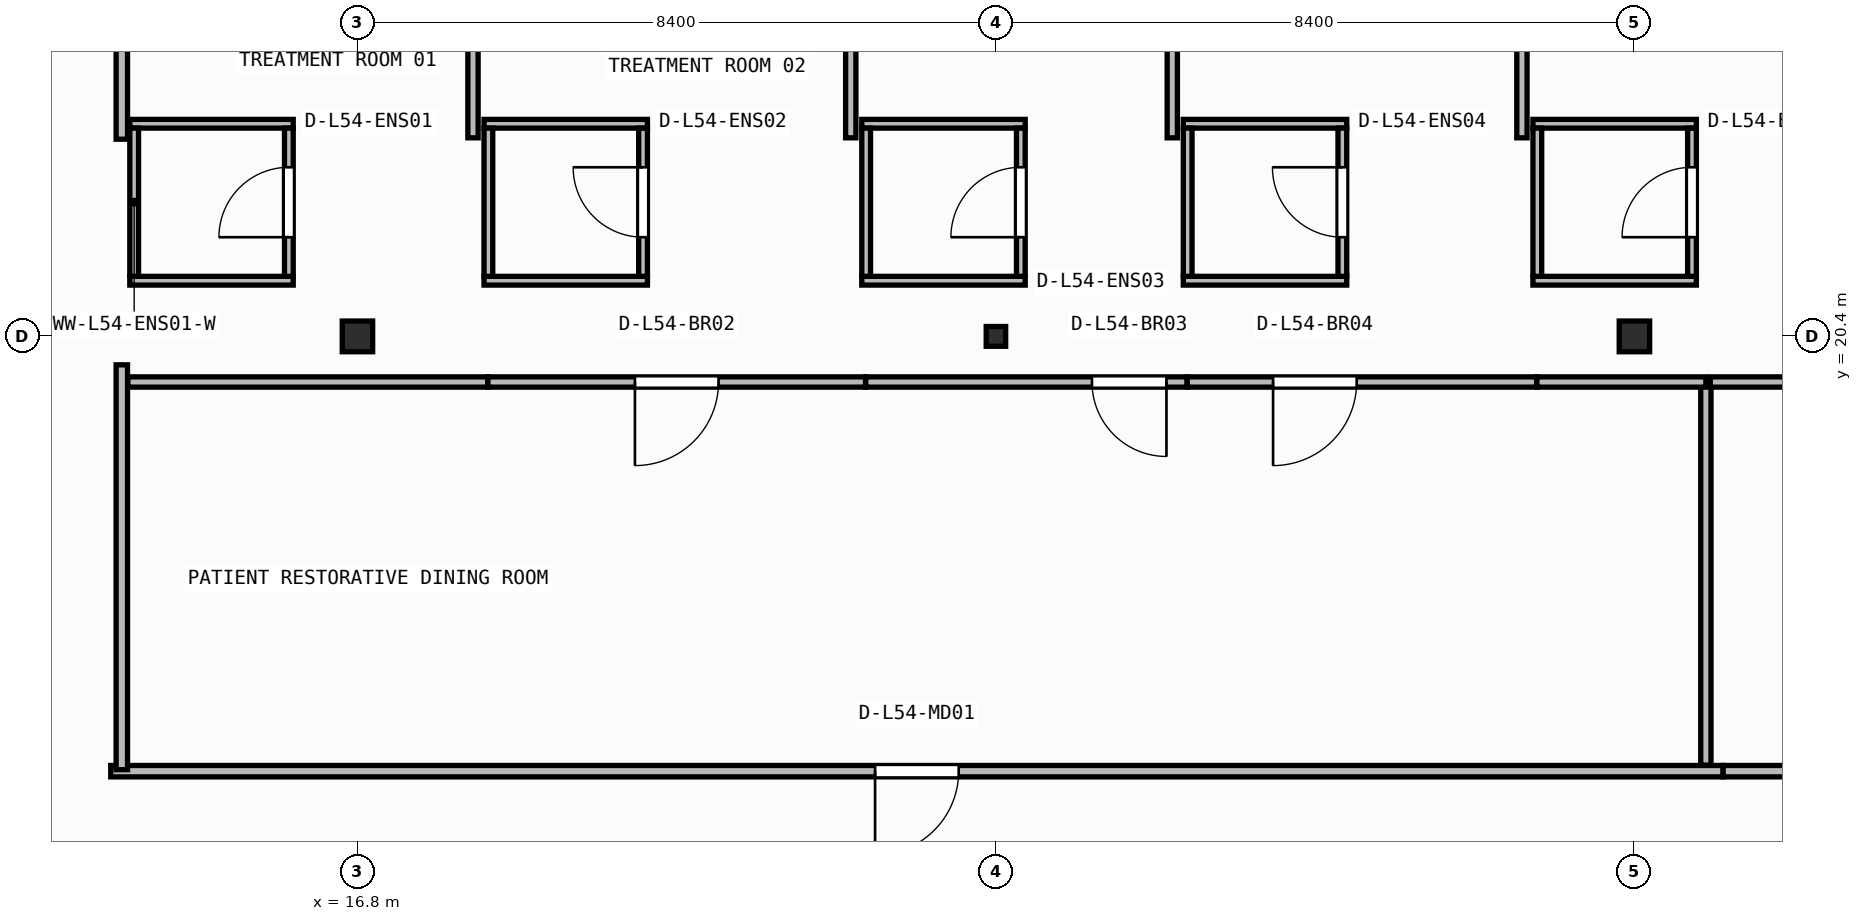
"""IFC4 building model, lengths in metres.
Left out: names, types, materials, properties, quantities, classifications, styles, units other than length and angle.
Written with IfcOpenShell. Run it as: python <this file> out.ifc"""

import sys

from ifc_helpers import new_model, si_unit, direction, frame, frame_2d, origin, origin_2d, place, context, subcontext, project, spatial, rectangle, i_section, extrude, element, fill, save


model = new_model("IFC4")
c1 = context("Model", 3, precision=1e-05, world=origin(), true_north=direction((0.0, 1.0)))
c2 = subcontext(c1, "Body", "Model", "MODEL_VIEW")
j1 = project(units=[si_unit("LENGTHUNIT", "METRE"), si_unit("PLANEANGLEUNIT", "RADIAN")], contexts=[c1])
p1 = place(None, origin())
s1 = spatial("IfcSite", under=j1, at=p1, CompositionType="ELEMENT")
p2 = place(p1, origin())
s2 = spatial("IfcBuilding", under=s1, at=p2, CompositionType="ELEMENT")
p3 = place(p2, frame((0.0, 0.0, 219.75)))
s3 = spatial("IfcBuildingStorey", under=s2, at=p3, CompositionType="ELEMENT", Elevation=219.75)
p4 = place(p3, frame((16.8, 20.4, 0.0), z_axis=(0.0, 0.0, 1.0), x_axis=(1.0, 0.0, 0.0)))
e1 = element("IfcColumn", 1, at=p4, inside=s3, PredefinedType="COLUMN", context=c2, shape_type="SweptSolid", body=[
    extrude(i_section(OverallWidth=0.4, OverallDepth=0.404, WebThickness=0.02, FlangeThickness=0.032, at=origin_2d()), origin(), (0.0, 0.0, 1.0), 3.95),
])
p5 = place(p3, frame((25.2, 20.4, 0.0), z_axis=(0.0, 0.0, 1.0), x_axis=(1.0, 0.0, 0.0)))
e2 = element("IfcColumn", 2, at=p5, inside=s3, PredefinedType="COLUMN", context=c2, shape_type="SweptSolid", body=[
    extrude(i_section(OverallWidth=0.256, OverallDepth=0.26, WebThickness=0.01, FlangeThickness=0.017, FilletRadius=0.013, at=origin_2d()), origin(), (0.0, 0.0, 1.0), 3.95),
])
p6 = place(p3, frame((33.6, 20.4, 0.0), z_axis=(0.0, 0.0, 1.0), x_axis=(1.0, 0.0, 0.0)))
e3 = element("IfcColumn", 3, at=p6, inside=s3, PredefinedType="COLUMN", context=c2, shape_type="SweptSolid", body=[
    extrude(i_section(OverallWidth=0.4, OverallDepth=0.404, WebThickness=0.02, FlangeThickness=0.032, at=origin_2d()), origin(), (0.0, 0.0, 1.0), 3.95),
])
for number, where, z_axis, x_axis in (
    (4, (13.805, 21.133, 0.0), (0.0, 0.0, 1.0), (1.0, 0.0, 0.0)),
    (5, (13.805, 23.198, 0.0), (0.0, 0.0, 1.0), (1.0, 0.0, 0.0)),
):
    element("IfcWall", number, at=place(p3, frame(where, z_axis=z_axis, x_axis=x_axis)), inside=s3, PredefinedType="PARTITIONING", context=c2, shape_type="SweptSolid", body=[
        extrude(rectangle(XDim=2.15, YDim=0.115, at=frame_2d((1.075, 0.0))), origin(), (0.0, 0.0, 1.0), 3.71),
    ])
p7 = place(p3, frame((13.863, 21.19, 0.0), z_axis=(0.0, 0.0, 1.0), x_axis=(0.0, 1.0, 0.0)))
e6 = element("IfcWall", 6, at=p7, inside=s3, PredefinedType="PARTITIONING", context=c2, shape_type="SweptSolid", body=[
    extrude(rectangle(XDim=1.95, YDim=0.115, at=frame_2d((0.975, 0.0))), origin(), (0.0, 0.0, 1.0), 3.71),
])
p8 = place(p3, frame((15.897, 21.19, 0.0), z_axis=(0.0, 0.0, 1.0), x_axis=(0.0, 1.0, 0.0)))
e7 = element("IfcWall", 7, at=p8, inside=s3, PredefinedType="PARTITIONING", context=c2, shape_type="SweptSolid", body=[
    extrude(rectangle(XDim=1.95, YDim=0.115, at=frame_2d((0.975, 0.0))), origin(), (0.0, 0.0, 1.0), 3.71),
])
p9 = place(p8, frame((0.515, 0.0, 0.0)))
e8 = element("IfcOpeningElement", 8, at=p9, cuts=e7, PredefinedType="OPENING", context=c2, shape_type="SweptSolid", body=[
    extrude(rectangle(XDim=0.92, YDim=2.1, at=frame_2d((0.46, 1.05))), frame((0.0, 0.067, 0.0), z_axis=(0.0, -1.0, 0.0), x_axis=(1.0, 0.0, 0.0)), (0.0, 0.0, 1.0), 0.135),
])
for number, where, z_axis, x_axis in (
    (9, (18.465, 21.133, 0.0), (0.0, 0.0, 1.0), (1.0, 0.0, 0.0)),
    (10, (18.465, 23.198, 0.0), (0.0, 0.0, 1.0), (1.0, 0.0, 0.0)),
):
    element("IfcWall", number, at=place(p3, frame(where, z_axis=z_axis, x_axis=x_axis)), inside=s3, PredefinedType="PARTITIONING", context=c2, shape_type="SweptSolid", body=[
        extrude(rectangle(XDim=2.15, YDim=0.115, at=frame_2d((1.075, 0.0))), origin(), (0.0, 0.0, 1.0), 3.71),
    ])
p10 = place(p3, frame((18.522, 21.19, 0.0), z_axis=(0.0, 0.0, 1.0), x_axis=(0.0, 1.0, 0.0)))
e11 = element("IfcWall", 11, at=p10, inside=s3, PredefinedType="PARTITIONING", context=c2, shape_type="SweptSolid", body=[
    extrude(rectangle(XDim=1.95, YDim=0.115, at=frame_2d((0.975, 0.0))), origin(), (0.0, 0.0, 1.0), 3.71),
])
p11 = place(p3, frame((20.558, 21.19, 0.0), z_axis=(0.0, 0.0, 1.0), x_axis=(0.0, 1.0, 0.0)))
e12 = element("IfcWall", 12, at=p11, inside=s3, PredefinedType="PARTITIONING", context=c2, shape_type="SweptSolid", body=[
    extrude(rectangle(XDim=1.95, YDim=0.115, at=frame_2d((0.975, 0.0))), origin(), (0.0, 0.0, 1.0), 3.71),
])
p12 = place(p11, frame((0.515, 0.0, 0.0)))
e13 = element("IfcOpeningElement", 13, at=p12, cuts=e12, PredefinedType="OPENING", context=c2, shape_type="SweptSolid", body=[
    extrude(rectangle(XDim=0.92, YDim=2.1, at=frame_2d((0.46, 1.05))), frame((0.0, 0.067, 0.0), z_axis=(0.0, -1.0, 0.0), x_axis=(1.0, 0.0, 0.0)), (0.0, 0.0, 1.0), 0.135),
])
for number, where, z_axis, x_axis in (
    (14, (23.435, 21.133, 0.0), (0.0, 0.0, 1.0), (1.0, 0.0, 0.0)),
    (15, (23.435, 23.198, 0.0), (0.0, 0.0, 1.0), (1.0, 0.0, 0.0)),
):
    element("IfcWall", number, at=place(p3, frame(where, z_axis=z_axis, x_axis=x_axis)), inside=s3, PredefinedType="PARTITIONING", context=c2, shape_type="SweptSolid", body=[
        extrude(rectangle(XDim=2.15, YDim=0.115, at=frame_2d((1.075, 0.0))), origin(), (0.0, 0.0, 1.0), 3.71),
    ])
p13 = place(p3, frame((23.492, 21.19, 0.0), z_axis=(0.0, 0.0, 1.0), x_axis=(0.0, 1.0, 0.0)))
e16 = element("IfcWall", 16, at=p13, inside=s3, PredefinedType="PARTITIONING", context=c2, shape_type="SweptSolid", body=[
    extrude(rectangle(XDim=1.95, YDim=0.115, at=frame_2d((0.975, 0.0))), origin(), (0.0, 0.0, 1.0), 3.71),
])
p14 = place(p3, frame((25.528, 21.19, 0.0), z_axis=(0.0, 0.0, 1.0), x_axis=(0.0, 1.0, 0.0)))
e17 = element("IfcWall", 17, at=p14, inside=s3, PredefinedType="PARTITIONING", context=c2, shape_type="SweptSolid", body=[
    extrude(rectangle(XDim=1.95, YDim=0.115, at=frame_2d((0.975, 0.0))), origin(), (0.0, 0.0, 1.0), 3.157),
])
p15 = place(p14, frame((0.515, 0.0, 0.0)))
e18 = element("IfcOpeningElement", 18, at=p15, cuts=e17, PredefinedType="OPENING", context=c2, shape_type="SweptSolid", body=[
    extrude(rectangle(XDim=0.92, YDim=2.1, at=frame_2d((0.46, 1.05))), frame((0.0, 0.067, 0.0), z_axis=(0.0, -1.0, 0.0), x_axis=(1.0, 0.0, 0.0)), (0.0, 0.0, 1.0), 0.135),
])
for number, where, z_axis, x_axis in (
    (19, (27.665, 21.133, 0.0), (0.0, 0.0, 1.0), (1.0, 0.0, 0.0)),
    (20, (27.665, 23.198, 0.0), (0.0, 0.0, 1.0), (1.0, 0.0, 0.0)),
):
    element("IfcWall", number, at=place(p3, frame(where, z_axis=z_axis, x_axis=x_axis)), inside=s3, PredefinedType="PARTITIONING", context=c2, shape_type="SweptSolid", body=[
        extrude(rectangle(XDim=2.15, YDim=0.115, at=frame_2d((1.075, 0.0))), origin(), (0.0, 0.0, 1.0), 3.71),
    ])
p16 = place(p3, frame((27.722, 21.19, 0.0), z_axis=(0.0, 0.0, 1.0), x_axis=(0.0, 1.0, 0.0)))
e21 = element("IfcWall", 21, at=p16, inside=s3, PredefinedType="PARTITIONING", context=c2, shape_type="SweptSolid", body=[
    extrude(rectangle(XDim=1.95, YDim=0.115, at=frame_2d((0.975, 0.0))), origin(), (0.0, 0.0, 1.0), 3.71),
])
p17 = place(p3, frame((29.758, 21.19, 0.0), z_axis=(0.0, 0.0, 1.0), x_axis=(0.0, 1.0, 0.0)))
e22 = element("IfcWall", 22, at=p17, inside=s3, PredefinedType="PARTITIONING", context=c2, shape_type="SweptSolid", body=[
    extrude(rectangle(XDim=1.95, YDim=0.115, at=frame_2d((0.975, 0.0))), origin(), (0.0, 0.0, 1.0), 3.71),
])
p18 = place(p17, frame((0.515, 0.0, 0.0)))
e23 = element("IfcOpeningElement", 23, at=p18, cuts=e22, PredefinedType="OPENING", context=c2, shape_type="SweptSolid", body=[
    extrude(rectangle(XDim=0.92, YDim=2.1, at=frame_2d((0.46, 1.05))), frame((0.0, 0.067, 0.0), z_axis=(0.0, -1.0, 0.0), x_axis=(1.0, 0.0, 0.0)), (0.0, 0.0, 1.0), 0.135),
])
for number, where, z_axis, x_axis in (
    (24, (32.265, 21.133, 0.0), (0.0, 0.0, 1.0), (1.0, 0.0, 0.0)),
    (25, (32.265, 23.198, 0.0), (0.0, 0.0, 1.0), (1.0, 0.0, 0.0)),
):
    element("IfcWall", number, at=place(p3, frame(where, z_axis=z_axis, x_axis=x_axis)), inside=s3, PredefinedType="PARTITIONING", context=c2, shape_type="SweptSolid", body=[
        extrude(rectangle(XDim=2.15, YDim=0.115, at=frame_2d((1.075, 0.0))), origin(), (0.0, 0.0, 1.0), 3.71),
    ])
p19 = place(p3, frame((32.323, 21.19, 0.0), z_axis=(0.0, 0.0, 1.0), x_axis=(0.0, 1.0, 0.0)))
e26 = element("IfcWall", 26, at=p19, inside=s3, PredefinedType="PARTITIONING", context=c2, shape_type="SweptSolid", body=[
    extrude(rectangle(XDim=1.95, YDim=0.115, at=frame_2d((0.975, 0.0))), origin(), (0.0, 0.0, 1.0), 3.71),
])
p20 = place(p3, frame((34.357, 21.19, 0.0), z_axis=(0.0, 0.0, 1.0), x_axis=(0.0, 1.0, 0.0)))
e27 = element("IfcWall", 27, at=p20, inside=s3, PredefinedType="PARTITIONING", context=c2, shape_type="SweptSolid", body=[
    extrude(rectangle(XDim=1.95, YDim=0.115, at=frame_2d((0.975, 0.0))), origin(), (0.0, 0.0, 1.0), 3.71),
])
p21 = place(p20, frame((0.515, 0.0, 0.0)))
e28 = element("IfcOpeningElement", 28, at=p21, cuts=e27, PredefinedType="OPENING", context=c2, shape_type="SweptSolid", body=[
    extrude(rectangle(XDim=0.92, YDim=2.1, at=frame_2d((0.46, 1.05))), frame((0.0, 0.067, 0.0), z_axis=(0.0, -1.0, 0.0), x_axis=(1.0, 0.0, 0.0)), (0.0, 0.0, 1.0), 0.135),
])
p22 = place(p3, frame((34.766, 14.68, 0.0), z_axis=(0.0, 0.0, 1.0), x_axis=(-1.0, 0.0, 0.0)))
e29 = element("IfcWall", 29, at=p22, inside=s3, PredefinedType="PARTITIONING", context=c2, shape_type="SweptSolid", body=[
    extrude(rectangle(XDim=21.212, YDim=0.15, at=frame_2d((10.606, 0.0))), origin(), (0.0, 0.0, 1.0), 3.71),
])
p23 = place(p22, frame((10.056, 0.0, 0.0)))
e30 = element("IfcOpeningElement", 30, at=p23, cuts=e29, PredefinedType="OPENING", context=c2, shape_type="SweptSolid", body=[
    extrude(rectangle(XDim=1.1, YDim=2.1, at=frame_2d((0.55, 1.05))), frame((0.0, 0.085, 0.0), z_axis=(0.0, -1.0, 0.0), x_axis=(1.0, 0.0, 0.0)), (0.0, 0.0, 1.0), 0.17),
])
p24 = place(p3, frame((51.04, 14.68, 0.0), z_axis=(0.0, 0.0, 1.0), x_axis=(-1.0, 0.0, 0.0)))
e31 = element("IfcWall", 31, at=p24, inside=s3, PredefinedType="PARTITIONING", context=c2, shape_type="SweptSolid", body=[
    extrude(rectangle(XDim=16.272, YDim=0.15, at=frame_2d((8.136, 0.0))), origin(), (0.0, 0.0, 1.0), 3.71),
])
p25 = place(p24, frame((7.586, 0.0, 0.0)))
e32 = element("IfcOpeningElement", 32, at=p25, cuts=e31, PredefinedType="OPENING", context=c2, shape_type="SweptSolid", body=[
    extrude(rectangle(XDim=1.1, YDim=2.1, at=frame_2d((0.55, 1.05))), frame((0.0, 0.085, 0.0), z_axis=(0.0, -1.0, 0.0), x_axis=(1.0, 0.0, 0.0)), (0.0, 0.0, 1.0), 0.17),
])
p26 = place(p3, frame((13.7, 14.7, 0.0), z_axis=(0.0, 0.0, 1.0), x_axis=(0.0, 1.0, 0.0)))
e33 = element("IfcWall", 33, at=p26, inside=s3, PredefinedType="PARTITIONING", context=c2, shape_type="SweptSolid", body=[
    extrude(rectangle(XDim=5.326, YDim=0.15, at=frame_2d((2.663, 0.0))), origin(), (0.0, 0.0, 1.0), 3.71),
])
p27 = place(p3, frame((13.7, 22.994, 0.0), z_axis=(0.0, 0.0, 1.0), x_axis=(0.0, 1.0, 0.0)))
e34 = element("IfcWall", 34, at=p27, inside=s3, PredefinedType="PARTITIONING", context=c2, shape_type="SweptSolid", body=[
    extrude(rectangle(XDim=3.606, YDim=0.15, at=frame_2d((1.803, 0.0))), origin(), (0.0, 0.0, 1.0), 3.71),
])
p28 = place(p27, frame((1.253, 0.0, 0.0)))
e35 = element("IfcOpeningElement", 35, at=p28, cuts=e34, PredefinedType="OPENING", context=c2, shape_type="SweptSolid", body=[
    extrude(rectangle(XDim=1.1, YDim=2.1, at=frame_2d((0.55, 1.05))), frame((0.0, 0.085, 0.0), z_axis=(0.0, -1.0, 0.0), x_axis=(1.0, 0.0, 0.0)), (0.0, 0.0, 1.0), 0.17),
])
p29 = place(p3, frame((34.54, 14.76, 0.0), z_axis=(0.0, 0.0, 1.0), x_axis=(0.0, 1.0, 0.0)))
e36 = element("IfcWall", 36, at=p29, inside=s3, PredefinedType="PARTITIONING", context=c2, shape_type="SweptSolid", body=[
    extrude(rectangle(XDim=5.04, YDim=0.135, at=frame_2d((2.52, 0.0))), origin(), (0.0, 0.0, 1.0), 3.71),
])
p30 = place(p3, frame((18.515, 19.8, 0.0), z_axis=(0.0, 0.0, 1.0), x_axis=(-1.0, 0.0, 0.0)))
e37 = element("IfcWall", 37, at=p30, inside=s3, PredefinedType="PARTITIONING", context=c2, shape_type="SweptSolid", body=[
    extrude(rectangle(XDim=4.735, YDim=0.135, at=frame_2d((2.367, 0.0))), origin(), (0.0, 0.0, 1.0), 3.71),
])
p31 = place(p3, frame((23.485, 19.8, 0.0), z_axis=(0.0, 0.0, 1.0), x_axis=(-1.0, 0.0, 0.0)))
e38 = element("IfcWall", 38, at=p31, inside=s3, PredefinedType="PARTITIONING", context=c2, shape_type="SweptSolid", body=[
    extrude(rectangle(XDim=4.968, YDim=0.135, at=frame_2d((2.484, 0.0))), origin(), (0.0, 0.0, 1.0), 3.71),
])
p32 = place(p31, frame((1.934, 0.0, 0.0)))
e39 = element("IfcOpeningElement", 39, at=p32, cuts=e38, PredefinedType="OPENING", context=c2, shape_type="SweptSolid", body=[
    extrude(rectangle(XDim=1.1, YDim=2.1, at=frame_2d((0.55, 1.05))), frame((0.0, 0.077, 0.0), z_axis=(0.0, -1.0, 0.0), x_axis=(1.0, 0.0, 0.0)), (0.0, 0.0, 1.0), 0.155),
])
p33 = place(p3, frame((27.715, 19.8, 0.0), z_axis=(0.0, 0.0, 1.0), x_axis=(-1.0, 0.0, 0.0)))
e40 = element("IfcWall", 40, at=p33, inside=s3, PredefinedType="PARTITIONING", context=c2, shape_type="SweptSolid", body=[
    extrude(rectangle(XDim=4.228, YDim=0.135, at=frame_2d((2.114, 0.0))), origin(), (0.0, 0.0, 1.0), 3.71),
])
p34 = place(p33, frame((0.271, 0.0, 0.0)))
e41 = element("IfcOpeningElement", 41, at=p34, cuts=e40, PredefinedType="OPENING", context=c2, shape_type="SweptSolid", body=[
    extrude(rectangle(XDim=0.98, YDim=2.1, at=frame_2d((0.49, 1.05))), frame((0.0, 0.077, 0.0), z_axis=(0.0, -1.0, 0.0), x_axis=(1.0, 0.0, 0.0)), (0.0, 0.0, 1.0), 0.155),
])
p35 = place(p3, frame((32.315, 19.8, 0.0), z_axis=(0.0, 0.0, 1.0), x_axis=(-1.0, 0.0, 0.0)))
e42 = element("IfcWall", 42, at=p35, inside=s3, PredefinedType="PARTITIONING", context=c2, shape_type="SweptSolid", body=[
    extrude(rectangle(XDim=4.598, YDim=0.135, at=frame_2d((2.299, 0.0))), origin(), (0.0, 0.0, 1.0), 3.71),
])
p36 = place(p35, frame((2.369, 0.0, 0.0)))
e43 = element("IfcOpeningElement", 43, at=p36, cuts=e42, PredefinedType="OPENING", context=c2, shape_type="SweptSolid", body=[
    extrude(rectangle(XDim=1.1, YDim=2.1, at=frame_2d((0.55, 1.05))), frame((0.0, 0.077, 0.0), z_axis=(0.0, -1.0, 0.0), x_axis=(1.0, 0.0, 0.0)), (0.0, 0.0, 1.0), 0.155),
])
p37 = place(p3, frame((34.54, 19.8, 0.0), z_axis=(0.0, 0.0, 1.0), x_axis=(-1.0, 0.0, 0.0)))
e44 = element("IfcWall", 44, at=p37, inside=s3, PredefinedType="PARTITIONING", context=c2, shape_type="SweptSolid", body=[
    extrude(rectangle(XDim=2.223, YDim=0.135, at=frame_2d((1.112, 0.0))), origin(), (0.0, 0.0, 1.0), 3.71),
])
p38 = place(p3, frame((37.285, 19.8, 0.0), z_axis=(0.0, 0.0, 1.0), x_axis=(-1.0, 0.0, 0.0)))
e45 = element("IfcWall", 45, at=p38, inside=s3, PredefinedType="PARTITIONING", context=c2, shape_type="SweptSolid", body=[
    extrude(rectangle(XDim=2.687, YDim=0.135, at=frame_2d((1.344, 0.0))), origin(), (0.0, 0.0, 1.0), 3.71),
])
p39 = place(p38, frame((0.23, 0.0, 0.0)))
e46 = element("IfcOpeningElement", 46, at=p39, cuts=e45, PredefinedType="OPENING", context=c2, shape_type="SweptSolid", body=[
    extrude(rectangle(XDim=1.1, YDim=2.1, at=frame_2d((0.55, 1.05))), frame((0.0, 0.077, 0.0), z_axis=(0.0, -1.0, 0.0), x_axis=(1.0, 0.0, 0.0)), (0.0, 0.0, 1.0), 0.155),
])
for number, where, z_axis, x_axis in (
    (47, (18.32, 23.012, 0.0), (0.0, 0.0, 1.0), (0.0, 1.0, 0.0)),
    (48, (23.29, 23.012, 0.0), (0.0, 0.0, 1.0), (0.0, 1.0, 0.0)),
    (49, (27.52, 23.012, 0.0), (0.0, 0.0, 1.0), (0.0, 1.0, 0.0)),
    (50, (32.12, 23.012, 0.0), (0.0, 0.0, 1.0), (0.0, 1.0, 0.0)),
):
    element("IfcWall", number, at=place(p3, frame(where, z_axis=z_axis, x_axis=x_axis)), inside=s3, PredefinedType="PARTITIONING", context=c2, shape_type="SweptSolid", body=[
        extrude(rectangle(XDim=3.508, YDim=0.135, at=frame_2d((1.754, 0.0))), origin(), (0.0, 0.0, 1.0), 3.71),
    ])
p40 = place(p9, origin())
e51 = element("IfcDoor", 51, at=p40, inside=s3, OperationType="SINGLE_SWING_LEFT", PredefinedType="DOOR", context=c2, shape_type="SweptSolid", body=[
    extrude(rectangle(XDim=0.92, YDim=2.1, at=frame_2d((0.46, 1.05))), frame((0.0, 0.025, 0.0), z_axis=(0.0, -1.0, 0.0), x_axis=(1.0, 0.0, 0.0)), (0.0, 0.0, 1.0), 0.05),
])
fill(e8, e51)
p41 = place(p12, origin())
e52 = element("IfcDoor", 52, at=p41, inside=s3, OperationType="SINGLE_SWING_RIGHT", PredefinedType="DOOR", context=c2, shape_type="SweptSolid", body=[
    extrude(rectangle(XDim=0.92, YDim=2.1, at=frame_2d((0.46, 1.05))), frame((0.0, 0.025, 0.0), z_axis=(0.0, -1.0, 0.0), x_axis=(1.0, 0.0, 0.0)), (0.0, 0.0, 1.0), 0.05),
])
fill(e13, e52)
p42 = place(p15, origin())
e53 = element("IfcDoor", 53, at=p42, inside=s3, OperationType="SINGLE_SWING_LEFT", PredefinedType="DOOR", context=c2, shape_type="SweptSolid", body=[
    extrude(rectangle(XDim=0.92, YDim=2.1, at=frame_2d((0.46, 1.05))), frame((0.0, 0.025, 0.0), z_axis=(0.0, -1.0, 0.0), x_axis=(1.0, 0.0, 0.0)), (0.0, 0.0, 1.0), 0.05),
])
fill(e18, e53)
p43 = place(p18, origin())
e54 = element("IfcDoor", 54, at=p43, inside=s3, OperationType="SINGLE_SWING_RIGHT", PredefinedType="DOOR", context=c2, shape_type="SweptSolid", body=[
    extrude(rectangle(XDim=0.92, YDim=2.1, at=frame_2d((0.46, 1.05))), frame((0.0, 0.025, 0.0), z_axis=(0.0, -1.0, 0.0), x_axis=(1.0, 0.0, 0.0)), (0.0, 0.0, 1.0), 0.05),
])
fill(e23, e54)
p44 = place(p21, origin())
e55 = element("IfcDoor", 55, at=p44, inside=s3, OperationType="SINGLE_SWING_LEFT", PredefinedType="DOOR", context=c2, shape_type="SweptSolid", body=[
    extrude(rectangle(XDim=0.92, YDim=2.1, at=frame_2d((0.46, 1.05))), frame((0.0, 0.025, 0.0), z_axis=(0.0, -1.0, 0.0), x_axis=(1.0, 0.0, 0.0)), (0.0, 0.0, 1.0), 0.05),
])
fill(e28, e55)
p45 = place(p23, origin())
e56 = element("IfcDoor", 56, at=p45, inside=s3, OperationType="SINGLE_SWING_RIGHT", PredefinedType="DOOR", context=c2, shape_type="SweptSolid", body=[
    extrude(rectangle(XDim=1.1, YDim=2.1, at=frame_2d((0.55, 1.05))), frame((0.0, 0.025, 0.0), z_axis=(0.0, -1.0, 0.0), x_axis=(1.0, 0.0, 0.0)), (0.0, 0.0, 1.0), 0.05),
])
fill(e30, e56)
p46 = place(p32, origin())
e57 = element("IfcDoor", 57, at=p46, inside=s3, OperationType="SINGLE_SWING_RIGHT", PredefinedType="DOOR", context=c2, shape_type="SweptSolid", body=[
    extrude(rectangle(XDim=1.1, YDim=2.1, at=frame_2d((0.55, 1.05))), frame((0.0, 0.025, 0.0), z_axis=(0.0, -1.0, 0.0), x_axis=(1.0, 0.0, 0.0)), (0.0, 0.0, 1.0), 0.05),
])
fill(e39, e57)
p47 = place(p34, origin())
e58 = element("IfcDoor", 58, at=p47, inside=s3, OperationType="SINGLE_SWING_LEFT", PredefinedType="DOOR", context=c2, shape_type="SweptSolid", body=[
    extrude(rectangle(XDim=0.98, YDim=2.1, at=frame_2d((0.49, 1.05))), frame((0.0, 0.025, 0.0), z_axis=(0.0, -1.0, 0.0), x_axis=(1.0, 0.0, 0.0)), (0.0, 0.0, 1.0), 0.05),
])
fill(e41, e58)
p48 = place(p36, origin())
e59 = element("IfcDoor", 59, at=p48, inside=s3, OperationType="SINGLE_SWING_RIGHT", PredefinedType="DOOR", context=c2, shape_type="SweptSolid", body=[
    extrude(rectangle(XDim=1.1, YDim=2.1, at=frame_2d((0.55, 1.05))), frame((0.0, 0.025, 0.0), z_axis=(0.0, -1.0, 0.0), x_axis=(1.0, 0.0, 0.0)), (0.0, 0.0, 1.0), 0.05),
])
fill(e43, e59)
save(model, sys.argv[1])
